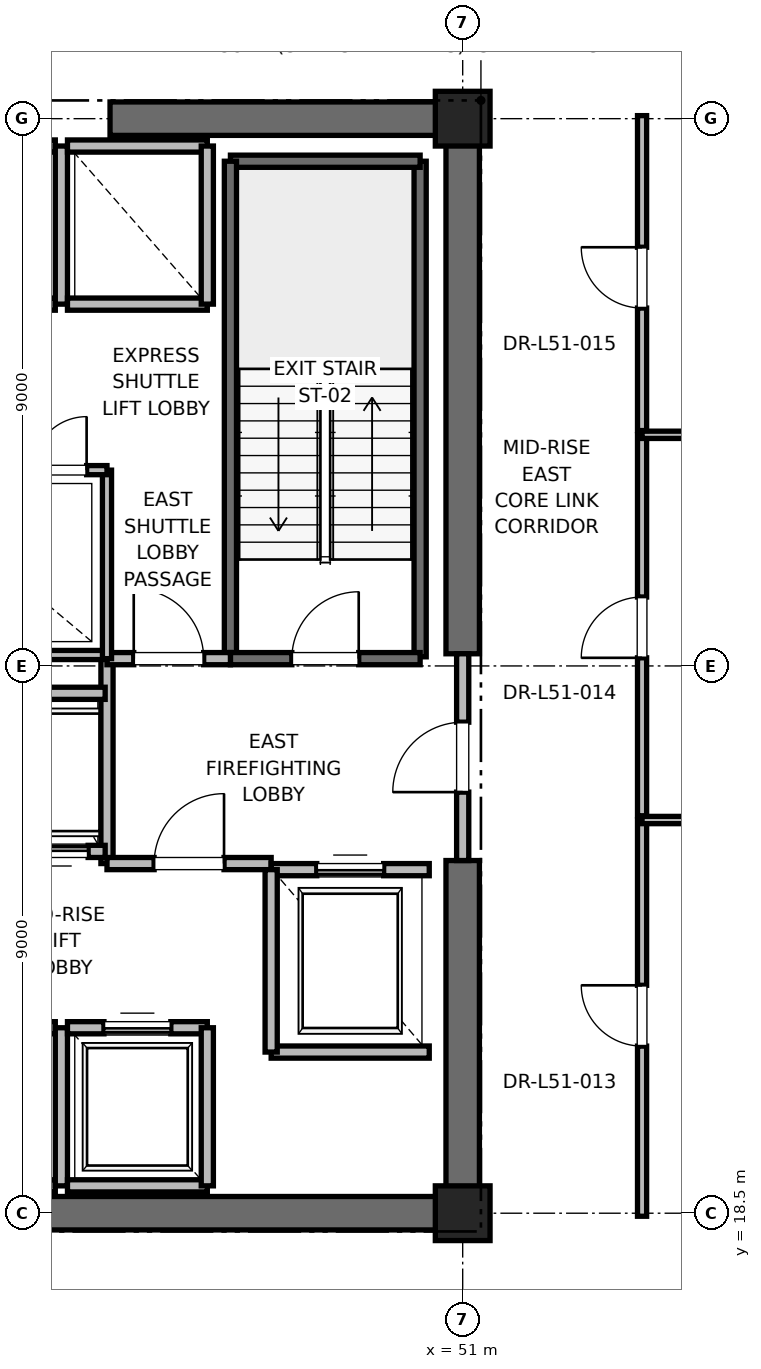
"""IFC4 building model, lengths in metres.
Left out: names, types, materials, properties, quantities, classifications, styles, units other than length and angle.
Written with IfcOpenShell. Run it as: python <this file> out.ifc"""

import sys

from ifc_helpers import new_model, si_unit, direction, frame, frame_2d, origin, origin_2d, place, context, subcontext, project, spatial, rectangle, extrude, element, fill, save


model = new_model("IFC4")
c1 = context("Model", 3, precision=1e-05, world=origin(), true_north=direction((0.0, 1.0)))
c2 = subcontext(c1, "Body", "Model", "MODEL_VIEW")
j1 = project(units=[si_unit("LENGTHUNIT", "METRE"), si_unit("PLANEANGLEUNIT", "RADIAN")], contexts=[c1])
p1 = place(None, origin())
s1 = spatial("IfcSite", under=j1, at=p1, CompositionType="ELEMENT")
p2 = place(p1, origin())
s2 = spatial("IfcBuilding", under=s1, at=p2, CompositionType="ELEMENT")
p3 = place(p2, frame((0.0, 0.0, 221.2)))
s3 = spatial("IfcBuildingStorey", under=s2, at=p3, CompositionType="ELEMENT", Elevation=221.2)
for number, where, z_axis, x_axis in (
    (1, (51.0, 18.5, 0.0), (0.0, 0.0, 1.0), (1.0, 0.0, 0.0)),
    (2, (51.0, 36.5, 0.0), (0.0, 0.0, 1.0), (1.0, 0.0, 0.0)),
):
    element("IfcColumn", number, at=place(p3, frame(where, z_axis=z_axis, x_axis=x_axis)), inside=s3, PredefinedType="PILASTER", context=c2, shape_type="SweptSolid", body=[
        extrude(rectangle(XDim=0.9, YDim=0.9, at=origin_2d()), origin(), (0.0, 0.0, 1.0), 4.0),
    ])
p4 = place(p3, frame((41.8, 18.5, 0.0), z_axis=(0.0, 0.0, 1.0), x_axis=(1.0, 0.0, 0.0)))
e3 = element("IfcWall", 3, at=p4, inside=s3, PredefinedType="SHEAR", context=c2, shape_type="SweptSolid", body=[
    extrude(rectangle(XDim=9.2, YDim=0.55, at=frame_2d((4.6, 0.0))), origin(), (0.0, 0.0, 1.0), 3.775),
])
for number, where, z_axis, x_axis in (
    (4, (45.2, 36.5, 0.0), (0.0, 0.0, 1.0), (1.0, 0.0, 0.0)),
    (5, (51.0, 18.5, 0.0), (0.0, 0.0, 1.0), (0.0, 1.0, 0.0)),
):
    element("IfcWall", number, at=place(p3, frame(where, z_axis=z_axis, x_axis=x_axis)), inside=s3, PredefinedType="SHEAR", context=c2, shape_type="SweptSolid", body=[
        extrude(rectangle(XDim=5.8, YDim=0.55, at=frame_2d((2.9, 0.0))), origin(), (0.0, 0.0, 1.0), 3.775),
    ])
p5 = place(p3, frame((51.0, 27.7, 0.0), z_axis=(0.0, 0.0, 1.0), x_axis=(0.0, 1.0, 0.0)))
e6 = element("IfcWall", 6, at=p5, inside=s3, PredefinedType="SHEAR", context=c2, shape_type="SweptSolid", body=[
    extrude(rectangle(XDim=8.8, YDim=0.55, at=frame_2d((4.4, 0.0))), origin(), (0.0, 0.0, 1.0), 3.775),
])
p6 = place(p3, frame((50.3, 27.65, 0.0), z_axis=(0.0, 0.0, 1.0), x_axis=(0.0, 1.0, 0.0)))
e7 = element("IfcWall", 7, at=p6, inside=s3, PredefinedType="SOLIDWALL", context=c2, shape_type="SweptSolid", body=[
    extrude(rectangle(XDim=8.15, YDim=0.2, at=frame_2d((4.075, 0.0))), origin(), (0.0, 0.0, 1.0), 3.775),
])
p7 = place(p3, frame((47.18, 35.8, 0.0), z_axis=(0.0, 0.0, 1.0), x_axis=(1.0, 0.0, 0.0)))
e8 = element("IfcWall", 8, at=p7, inside=s3, PredefinedType="SOLIDWALL", context=c2, shape_type="SweptSolid", body=[
    extrude(rectangle(XDim=3.12, YDim=0.2, at=frame_2d((1.56, 0.0))), origin(), (0.0, 0.0, 1.0), 3.775),
])
p8 = place(p3, frame((47.18, 27.62, 0.0), z_axis=(0.0, 0.0, 1.0), x_axis=(0.0, 1.0, 0.0)))
e9 = element("IfcWall", 9, at=p8, inside=s3, PredefinedType="SOLIDWALL", context=c2, shape_type="SweptSolid", body=[
    extrude(rectangle(XDim=8.18, YDim=0.2, at=frame_2d((4.09, 0.0))), origin(), (0.0, 0.0, 1.0), 3.775),
])
p9 = place(p3, frame((47.18, 27.62, 0.0), z_axis=(0.0, 0.0, 1.0), x_axis=(1.0, 0.0, 0.0)))
e10 = element("IfcWall", 10, at=p9, inside=s3, PredefinedType="SOLIDWALL", context=c2, shape_type="SweptSolid", body=[
    extrude(rectangle(XDim=3.12, YDim=0.2, at=frame_2d((1.56, 0.0))), origin(), (0.0, 0.0, 1.0), 3.775),
])
p10 = place(p9, frame((1.01, 0.0, 0.0)))
e11 = element("IfcOpeningElement", 11, at=p10, cuts=e10, PredefinedType="OPENING", context=c2, shape_type="SweptSolid", body=[
    extrude(rectangle(XDim=1.1, YDim=2.15, at=frame_2d((0.55, 1.075))), frame((0.0, 0.1, 0.0), z_axis=(0.0, -1.0, 0.0), x_axis=(1.0, 0.0, 0.0)), (0.0, 0.0, 1.0), 0.2),
])
p11 = place(p3, frame((45.15, 24.25, 0.0), z_axis=(0.0, 0.0, 1.0), x_axis=(0.0, 1.0, 0.0)))
e12 = element("IfcWall", 12, at=p11, inside=s3, PredefinedType="PARTITIONING", context=c2, shape_type="SweptSolid", body=[
    extrude(rectangle(XDim=3.37, YDim=0.2, at=frame_2d((1.685, 0.0))), origin(), (0.0, 0.0, 1.0), 3.775),
])
p12 = place(p3, frame((45.15, 24.25, 0.0), z_axis=(0.0, 0.0, 1.0), x_axis=(1.0, 0.0, 0.0)))
e13 = element("IfcWall", 13, at=p12, inside=s3, PredefinedType="PARTITIONING", context=c2, shape_type="SweptSolid", body=[
    extrude(rectangle(XDim=2.7, YDim=0.2, at=frame_2d((1.35, 0.0))), origin(), (0.0, 0.0, 1.0), 3.775),
])
p13 = place(p12, frame((0.775, 0.0, 0.0)))
e14 = element("IfcOpeningElement", 14, at=p13, cuts=e13, PredefinedType="OPENING", context=c2, shape_type="SweptSolid", body=[
    extrude(rectangle(XDim=1.15, YDim=2.2, at=frame_2d((0.575, 1.1))), frame((0.0, 0.1, 0.0), z_axis=(0.0, -1.0, 0.0), x_axis=(1.0, 0.0, 0.0)), (0.0, 0.0, 1.0), 0.2),
])
p14 = place(p3, frame((45.15, 27.62, 0.0), z_axis=(0.0, 0.0, 1.0), x_axis=(1.0, 0.0, 0.0)))
e15 = element("IfcWall", 15, at=p14, inside=s3, PredefinedType="PARTITIONING", context=c2, shape_type="SweptSolid", body=[
    extrude(rectangle(XDim=2.03, YDim=0.2, at=frame_2d((1.015, 0.0))), origin(), (0.0, 0.0, 1.0), 3.775),
])
p15 = place(p14, frame((0.44, 0.0, 0.0)))
e16 = element("IfcOpeningElement", 16, at=p15, cuts=e15, PredefinedType="OPENING", context=c2, shape_type="SweptSolid", body=[
    extrude(rectangle(XDim=1.15, YDim=2.2, at=frame_2d((0.575, 1.1))), frame((0.0, 0.1, 0.0), z_axis=(0.0, -1.0, 0.0), x_axis=(1.0, 0.0, 0.0)), (0.0, 0.0, 1.0), 0.2),
])
p16 = place(p3, frame((51.0, 24.3, 0.0), z_axis=(0.0, 0.0, 1.0), x_axis=(0.0, 1.0, 0.0)))
e17 = element("IfcWall", 17, at=p16, inside=s3, PredefinedType="PARTITIONING", context=c2, shape_type="SweptSolid", body=[
    extrude(rectangle(XDim=3.4, YDim=0.2, at=frame_2d((1.7, 0.0))), origin(), (0.0, 0.0, 1.0), 2.755),
])
p17 = place(p16, frame((1.125, 0.0, 0.0)))
e18 = element("IfcOpeningElement", 18, at=p17, cuts=e17, PredefinedType="OPENING", context=c2, shape_type="SweptSolid", body=[
    extrude(rectangle(XDim=1.15, YDim=2.2, at=frame_2d((0.575, 1.1))), frame((0.0, 0.1, 0.0), z_axis=(0.0, -1.0, 0.0), x_axis=(1.0, 0.0, 0.0)), (0.0, 0.0, 1.0), 0.2),
])
p18 = place(p3, frame((47.85, 21.15, 0.0), z_axis=(0.0, 0.0, 1.0), x_axis=(1.0, 0.0, 0.0)))
e19 = element("IfcWall", 19, at=p18, inside=s3, PredefinedType="SOLIDWALL", context=c2, shape_type="SweptSolid", body=[
    extrude(rectangle(XDim=2.6, YDim=0.2, at=frame_2d((1.3, 0.0))), origin(), (0.0, 0.0, 1.0), 3.775),
])
p19 = place(p3, frame((50.45, 24.15, 0.0), z_axis=(0.0, 0.0, 1.0), x_axis=(-1.0, 0.0, 0.0)))
e20 = element("IfcWall", 20, at=p19, inside=s3, PredefinedType="SOLIDWALL", context=c2, shape_type="SweptSolid", body=[
    extrude(rectangle(XDim=2.6, YDim=0.2, at=frame_2d((1.3, 0.0))), origin(), (0.0, 0.0, 1.0), 2.755),
])
p20 = place(p19, frame((0.75, 0.0, 0.0)))
e21 = element("IfcOpeningElement", 21, at=p20, cuts=e20, PredefinedType="OPENING", context=c2, shape_type="SweptSolid", body=[
    extrude(rectangle(XDim=1.1, YDim=2.2, at=frame_2d((0.55, 1.1))), frame((0.0, 0.1, 0.0), z_axis=(0.0, -1.0, 0.0), x_axis=(1.0, 0.0, 0.0)), (0.0, 0.0, 1.0), 0.2),
])
p21 = place(p3, frame((47.85, 24.15, 0.0), z_axis=(0.0, 0.0, 1.0), x_axis=(0.0, -1.0, 0.0)))
e22 = element("IfcWall", 22, at=p21, inside=s3, PredefinedType="SOLIDWALL", context=c2, shape_type="SweptSolid", body=[
    extrude(rectangle(XDim=3.0, YDim=0.2, at=frame_2d((1.5, 0.0))), origin(), (0.0, 0.0, 1.0), 3.775),
])
p22 = place(p3, frame((42.0, 18.95, 0.0), z_axis=(0.0, 0.0, 1.0), x_axis=(1.0, 0.0, 0.0)))
e23 = element("IfcWall", 23, at=p22, inside=s3, PredefinedType="SOLIDWALL", context=c2, shape_type="SweptSolid", body=[
    extrude(rectangle(XDim=2.3, YDim=0.2, at=frame_2d((1.15, 0.0))), origin(), (0.0, 0.0, 1.0), 2.755),
])
p23 = place(p3, frame((44.3, 21.55, 0.0), z_axis=(0.0, 0.0, 1.0), x_axis=(-1.0, 0.0, 0.0)))
e24 = element("IfcWall", 24, at=p23, inside=s3, PredefinedType="SOLIDWALL", context=c2, shape_type="SweptSolid", body=[
    extrude(rectangle(XDim=2.3, YDim=0.2, at=frame_2d((1.15, 0.0))), origin(), (0.0, 0.0, 1.0), 3.775),
])
p24 = place(p23, frame((0.6, 0.0, 0.0)))
e25 = element("IfcOpeningElement", 25, at=p24, cuts=e24, PredefinedType="OPENING", context=c2, shape_type="SweptSolid", body=[
    extrude(rectangle(XDim=1.1, YDim=2.2, at=frame_2d((0.55, 1.1))), frame((0.0, 0.1, 0.0), z_axis=(0.0, -1.0, 0.0), x_axis=(1.0, 0.0, 0.0)), (0.0, 0.0, 1.0), 0.2),
])
p25 = place(p3, frame((44.4, 18.95, 0.0), z_axis=(0.0, 0.0, 1.0), x_axis=(0.0, 1.0, 0.0)))
e26 = element("IfcWall", 26, at=p25, inside=s3, PredefinedType="SOLIDWALL", context=c2, shape_type="SweptSolid", body=[
    extrude(rectangle(XDim=2.6, YDim=0.2, at=frame_2d((1.3, 0.0))), origin(), (0.0, 0.0, 1.0), 3.775),
])
p26 = place(p3, frame((44.5, 18.95, 0.0), z_axis=(0.0, 0.0, 1.0), x_axis=(1.0, 0.0, 0.0)))
e27 = element("IfcWall", 27, at=p26, inside=s3, PredefinedType="SOLIDWALL", context=c2, shape_type="SweptSolid", body=[
    extrude(rectangle(XDim=2.3, YDim=0.2, at=frame_2d((1.15, 0.0))), origin(), (0.0, 0.0, 1.0), 3.775),
])
p27 = place(p3, frame((46.8, 21.55, 0.0), z_axis=(0.0, 0.0, 1.0), x_axis=(-1.0, 0.0, 0.0)))
e28 = element("IfcWall", 28, at=p27, inside=s3, PredefinedType="SOLIDWALL", context=c2, shape_type="SweptSolid", body=[
    extrude(rectangle(XDim=2.3, YDim=0.2, at=frame_2d((1.15, 0.0))), origin(), (0.0, 0.0, 1.0), 3.775),
])
p28 = place(p27, frame((0.6, 0.0, 0.0)))
e29 = element("IfcOpeningElement", 29, at=p28, cuts=e28, PredefinedType="OPENING", context=c2, shape_type="SweptSolid", body=[
    extrude(rectangle(XDim=1.1, YDim=2.2, at=frame_2d((0.55, 1.1))), frame((0.0, 0.1, 0.0), z_axis=(0.0, -1.0, 0.0), x_axis=(1.0, 0.0, 0.0)), (0.0, 0.0, 1.0), 0.2),
])
p29 = place(p3, frame((46.8, 18.95, 0.0), z_axis=(0.0, 0.0, 1.0), x_axis=(0.0, 1.0, 0.0)))
e30 = element("IfcWall", 30, at=p29, inside=s3, PredefinedType="SOLIDWALL", context=c2, shape_type="SweptSolid", body=[
    extrude(rectangle(XDim=2.6, YDim=0.2, at=frame_2d((1.3, 0.0))), origin(), (0.0, 0.0, 1.0), 3.775),
])
p30 = place(p3, frame((43.46, 24.45, 0.0), z_axis=(0.0, 0.0, 1.0), x_axis=(1.0, 0.0, 0.0)))
e31 = element("IfcWall", 31, at=p30, inside=s3, PredefinedType="SOLIDWALL", context=c2, shape_type="SweptSolid", body=[
    extrude(rectangle(XDim=1.66, YDim=0.2, at=frame_2d((0.83, 0.0))), origin(), (0.0, 0.0, 1.0), 3.775),
])
p31 = place(p30, frame((0.28, 0.0, 0.0)))
e32 = element("IfcOpeningElement", 32, at=p31, cuts=e31, PredefinedType="OPENING", context=c2, shape_type="SweptSolid", body=[
    extrude(rectangle(XDim=1.1, YDim=2.2, at=frame_2d((0.55, 1.1))), frame((0.0, 0.1, 0.0), z_axis=(0.0, -1.0, 0.0), x_axis=(1.0, 0.0, 0.0)), (0.0, 0.0, 1.0), 0.2),
])
p32 = place(p3, frame((45.12, 27.05, 0.0), z_axis=(0.0, 0.0, 1.0), x_axis=(-1.0, 0.0, 0.0)))
e33 = element("IfcWall", 33, at=p32, inside=s3, PredefinedType="SOLIDWALL", context=c2, shape_type="SweptSolid", body=[
    extrude(rectangle(XDim=1.66, YDim=0.2, at=frame_2d((0.83, 0.0))), origin(), (0.0, 0.0, 1.0), 3.775),
])
p33 = place(p3, frame((42.0, 33.45, 0.0), z_axis=(0.0, 0.0, 1.0), x_axis=(1.0, 0.0, 0.0)))
e34 = element("IfcWall", 34, at=p33, inside=s3, PredefinedType="SOLIDWALL", context=c2, shape_type="SweptSolid", body=[
    extrude(rectangle(XDim=2.3, YDim=0.2, at=frame_2d((1.15, 0.0))), origin(), (0.0, 0.0, 1.0), 3.775),
])
p34 = place(p3, frame((44.3, 36.05, 0.0), z_axis=(0.0, 0.0, 1.0), x_axis=(-1.0, 0.0, 0.0)))
e35 = element("IfcWall", 35, at=p34, inside=s3, PredefinedType="SOLIDWALL", context=c2, shape_type="SweptSolid", body=[
    extrude(rectangle(XDim=2.3, YDim=0.2, at=frame_2d((1.15, 0.0))), origin(), (0.0, 0.0, 1.0), 2.755),
])
p35 = place(p3, frame((44.4, 33.45, 0.0), z_axis=(0.0, 0.0, 1.0), x_axis=(0.0, 1.0, 0.0)))
e36 = element("IfcWall", 36, at=p35, inside=s3, PredefinedType="SOLIDWALL", context=c2, shape_type="SweptSolid", body=[
    extrude(rectangle(XDim=2.6, YDim=0.2, at=frame_2d((1.3, 0.0))), origin(), (0.0, 0.0, 1.0), 2.755),
])
p36 = place(p3, frame((44.5, 33.45, 0.0), z_axis=(0.0, 0.0, 1.0), x_axis=(1.0, 0.0, 0.0)))
e37 = element("IfcWall", 37, at=p36, inside=s3, PredefinedType="SOLIDWALL", context=c2, shape_type="SweptSolid", body=[
    extrude(rectangle(XDim=2.3, YDim=0.2, at=frame_2d((1.15, 0.0))), origin(), (0.0, 0.0, 1.0), 3.775),
])
p37 = place(p3, frame((46.8, 36.05, 0.0), z_axis=(0.0, 0.0, 1.0), x_axis=(-1.0, 0.0, 0.0)))
e38 = element("IfcWall", 38, at=p37, inside=s3, PredefinedType="SOLIDWALL", context=c2, shape_type="SweptSolid", body=[
    extrude(rectangle(XDim=2.3, YDim=0.2, at=frame_2d((1.15, 0.0))), origin(), (0.0, 0.0, 1.0), 2.755),
])
p38 = place(p3, frame((46.8, 33.45, 0.0), z_axis=(0.0, 0.0, 1.0), x_axis=(0.0, 1.0, 0.0)))
e39 = element("IfcWall", 39, at=p38, inside=s3, PredefinedType="SOLIDWALL", context=c2, shape_type="SweptSolid", body=[
    extrude(rectangle(XDim=2.6, YDim=0.2, at=frame_2d((1.3, 0.0))), origin(), (0.0, 0.0, 1.0), 3.775),
])
p39 = place(p3, frame((41.56, 27.68, 0.0), z_axis=(0.0, 0.0, 1.0), x_axis=(1.0, 0.0, 0.0)))
e40 = element("IfcWall", 40, at=p39, inside=s3, PredefinedType="PARTITIONING", context=c2, shape_type="SweptSolid", body=[
    extrude(rectangle(XDim=3.59, YDim=0.15, at=frame_2d((1.795, 0.0))), origin(), (0.0, 0.0, 1.0), 2.85),
])
p40 = place(p3, frame((45.15, 27.62, 0.0), z_axis=(0.0, 0.0, 1.0), x_axis=(0.0, 1.0, 0.0)))
e41 = element("IfcWall", 41, at=p40, inside=s3, PredefinedType="PARTITIONING", context=c2, shape_type="SweptSolid", body=[
    extrude(rectangle(XDim=3.1, YDim=0.15, at=frame_2d((1.55, 0.0))), origin(), (0.0, 0.0, 1.0), 2.85),
])
p41 = place(p3, frame((43.6, 30.72, 0.0), z_axis=(0.0, 0.0, 1.0), x_axis=(1.0, 0.0, 0.0)))
e42 = element("IfcWall", 42, at=p41, inside=s3, PredefinedType="PARTITIONING", context=c2, shape_type="SweptSolid", body=[
    extrude(rectangle(XDim=1.55, YDim=0.15, at=frame_2d((0.775, 0.0))), origin(), (0.0, 0.0, 1.0), 2.85),
])
p42 = place(p41, frame((0.335, 0.0, 0.0)))
e43 = element("IfcOpeningElement", 43, at=p42, cuts=e42, PredefinedType="OPENING", context=c2, shape_type="SweptSolid", body=[
    extrude(rectangle(XDim=0.88, YDim=2.1, at=frame_2d((0.44, 1.05))), frame((0.0, 0.075, 0.0), z_axis=(0.0, -1.0, 0.0), x_axis=(1.0, 0.0, 0.0)), (0.0, 0.0, 1.0), 0.15),
])
p43 = place(p3, frame((53.95, 18.45, 0.0), z_axis=(0.0, 0.0, 1.0), x_axis=(0.0, 1.0, 0.0)))
e44 = element("IfcWall", 44, at=p43, inside=s3, PredefinedType="PARTITIONING", context=c2, shape_type="SweptSolid", body=[
    extrude(rectangle(XDim=6.516, YDim=0.15, at=frame_2d((3.258, 0.0))), origin(), (0.0, 0.0, 1.0), 2.85),
])
p44 = place(p43, frame((2.798, 0.0, 0.0)))
e45 = element("IfcOpeningElement", 45, at=p44, cuts=e44, PredefinedType="OPENING", context=c2, shape_type="SweptSolid", body=[
    extrude(rectangle(XDim=1.0, YDim=2.15, at=frame_2d((0.5, 1.075))), frame((0.0, 0.075, 0.0), z_axis=(0.0, -1.0, 0.0), x_axis=(1.0, 0.0, 0.0)), (0.0, 0.0, 1.0), 0.15),
])
p45 = place(p3, frame((53.95, 24.966, 0.0), z_axis=(0.0, 0.0, 1.0), x_axis=(1.0, 0.0, 0.0)))
e46 = element("IfcWall", 46, at=p45, inside=s3, PredefinedType="PARTITIONING", context=c2, shape_type="SweptSolid", body=[
    extrude(rectangle(XDim=11.581, YDim=0.12, at=frame_2d((5.791, 0.0))), origin(), (0.0, 0.0, 1.0), 2.85),
])
p46 = place(p3, frame((53.95, 25.036, 0.0), z_axis=(0.0, 0.0, 1.0), x_axis=(0.0, 1.0, 0.0)))
e47 = element("IfcWall", 47, at=p46, inside=s3, PredefinedType="PARTITIONING", context=c2, shape_type="SweptSolid", body=[
    extrude(rectangle(XDim=6.265, YDim=0.15, at=frame_2d((3.133, 0.0))), origin(), (0.0, 0.0, 1.0), 2.85),
])
p47 = place(p46, frame((2.597, 0.0, 0.0)))
e48 = element("IfcOpeningElement", 48, at=p47, cuts=e47, PredefinedType="OPENING", context=c2, shape_type="SweptSolid", body=[
    extrude(rectangle(XDim=1.0, YDim=2.15, at=frame_2d((0.5, 1.075))), frame((0.0, 0.075, 0.0), z_axis=(0.0, -1.0, 0.0), x_axis=(1.0, 0.0, 0.0)), (0.0, 0.0, 1.0), 0.15),
])
p48 = place(p3, frame((53.95, 31.301, 0.0), z_axis=(0.0, 0.0, 1.0), x_axis=(1.0, 0.0, 0.0)))
e49 = element("IfcWall", 49, at=p48, inside=s3, PredefinedType="PARTITIONING", context=c2, shape_type="SweptSolid", body=[
    extrude(rectangle(XDim=11.581, YDim=0.12, at=frame_2d((5.791, 0.0))), origin(), (0.0, 0.0, 1.0), 2.85),
])
p49 = place(p3, frame((53.95, 31.371, 0.0), z_axis=(0.0, 0.0, 1.0), x_axis=(0.0, 1.0, 0.0)))
e50 = element("IfcWall", 50, at=p49, inside=s3, PredefinedType="PARTITIONING", context=c2, shape_type="SweptSolid", body=[
    extrude(rectangle(XDim=5.179, YDim=0.15, at=frame_2d((2.589, 0.0))), origin(), (0.0, 0.0, 1.0), 2.85),
])
p50 = place(p49, frame((2.014, 0.0, 0.0)))
e51 = element("IfcOpeningElement", 51, at=p50, cuts=e50, PredefinedType="OPENING", context=c2, shape_type="SweptSolid", body=[
    extrude(rectangle(XDim=1.0, YDim=2.15, at=frame_2d((0.5, 1.075))), frame((0.0, 0.075, 0.0), z_axis=(0.0, -1.0, 0.0), x_axis=(1.0, 0.0, 0.0)), (0.0, 0.0, 1.0), 0.15),
])
p51 = place(p10, origin())
e52 = element("IfcDoor", 52, at=p51, inside=s3, OperationType="SINGLE_SWING_RIGHT", PredefinedType="DOOR", context=c2, shape_type="SweptSolid", body=[
    extrude(rectangle(XDim=1.1, YDim=2.15, at=frame_2d((0.55, 1.075))), frame((0.0, 0.025, 0.0), z_axis=(0.0, -1.0, 0.0), x_axis=(1.0, 0.0, 0.0)), (0.0, 0.0, 1.0), 0.05),
])
fill(e11, e52)
p52 = place(p13, origin())
e53 = element("IfcDoor", 53, at=p52, inside=s3, OperationType="SINGLE_SWING_RIGHT", PredefinedType="DOOR", context=c2, shape_type="SweptSolid", body=[
    extrude(rectangle(XDim=1.15, YDim=2.2, at=frame_2d((0.575, 1.1))), frame((0.0, 0.025, 0.0), z_axis=(0.0, -1.0, 0.0), x_axis=(1.0, 0.0, 0.0)), (0.0, 0.0, 1.0), 0.05),
])
fill(e14, e53)
p53 = place(p15, origin())
e54 = element("IfcDoor", 54, at=p53, inside=s3, OperationType="SINGLE_SWING_LEFT", PredefinedType="DOOR", context=c2, shape_type="SweptSolid", body=[
    extrude(rectangle(XDim=1.15, YDim=2.2, at=frame_2d((0.575, 1.1))), frame((0.0, 0.025, 0.0), z_axis=(0.0, -1.0, 0.0), x_axis=(1.0, 0.0, 0.0)), (0.0, 0.0, 1.0), 0.05),
])
fill(e16, e54)
p54 = place(p17, origin())
e55 = element("IfcDoor", 55, at=p54, inside=s3, OperationType="SINGLE_SWING_LEFT", PredefinedType="DOOR", context=c2, shape_type="SweptSolid", body=[
    extrude(rectangle(XDim=1.15, YDim=2.2, at=frame_2d((0.575, 1.1))), frame((0.0, 0.025, 0.0), z_axis=(0.0, -1.0, 0.0), x_axis=(1.0, 0.0, 0.0)), (0.0, 0.0, 1.0), 0.05),
])
fill(e18, e55)
p55 = place(p20, origin())
e56 = element("IfcDoor", 56, at=p55, inside=s3, OperationType="SLIDING_TO_RIGHT", PredefinedType="DOOR", context=c2, shape_type="SweptSolid", body=[
    extrude(rectangle(XDim=1.1, YDim=2.2, at=frame_2d((0.55, 1.1))), frame((0.0, 0.025, 0.0), z_axis=(0.0, -1.0, 0.0), x_axis=(1.0, 0.0, 0.0)), (0.0, 0.0, 1.0), 0.05),
])
fill(e21, e56)
p56 = place(p28, origin())
e57 = element("IfcDoor", 57, at=p56, inside=s3, OperationType="SLIDING_TO_RIGHT", PredefinedType="DOOR", context=c2, shape_type="SweptSolid", body=[
    extrude(rectangle(XDim=1.1, YDim=2.2, at=frame_2d((0.55, 1.1))), frame((0.0, 0.025, 0.0), z_axis=(0.0, -1.0, 0.0), x_axis=(1.0, 0.0, 0.0)), (0.0, 0.0, 1.0), 0.05),
])
fill(e29, e57)
p57 = place(p31, origin())
e58 = element("IfcDoor", 58, at=p57, inside=s3, OperationType="SLIDING_TO_RIGHT", PredefinedType="DOOR", context=c2, shape_type="SweptSolid", body=[
    extrude(rectangle(XDim=1.1, YDim=2.2, at=frame_2d((0.55, 1.1))), frame((0.0, 0.025, 0.0), z_axis=(0.0, -1.0, 0.0), x_axis=(1.0, 0.0, 0.0)), (0.0, 0.0, 1.0), 0.05),
])
fill(e32, e58)
p58 = place(p42, origin())
e59 = element("IfcDoor", 59, at=p58, inside=s3, OperationType="SINGLE_SWING_RIGHT", PredefinedType="DOOR", context=c2, shape_type="SweptSolid", body=[
    extrude(rectangle(XDim=0.88, YDim=2.1, at=frame_2d((0.44, 1.05))), frame((0.0, 0.025, 0.0), z_axis=(0.0, -1.0, 0.0), x_axis=(1.0, 0.0, 0.0)), (0.0, 0.0, 1.0), 0.05),
])
fill(e43, e59)
p59 = place(p44, origin())
e60 = element("IfcDoor", 60, at=p59, inside=s3, OperationType="SINGLE_SWING_RIGHT", PredefinedType="DOOR", context=c2, shape_type="SweptSolid", body=[
    extrude(rectangle(XDim=1.0, YDim=2.15, at=frame_2d((0.5, 1.075))), frame((0.0, 0.025, 0.0), z_axis=(0.0, -1.0, 0.0), x_axis=(1.0, 0.0, 0.0)), (0.0, 0.0, 1.0), 0.05),
])
fill(e45, e60)
p60 = place(p47, origin())
e61 = element("IfcDoor", 61, at=p60, inside=s3, OperationType="SINGLE_SWING_LEFT", PredefinedType="DOOR", context=c2, shape_type="SweptSolid", body=[
    extrude(rectangle(XDim=1.0, YDim=2.15, at=frame_2d((0.5, 1.075))), frame((0.0, 0.025, 0.0), z_axis=(0.0, -1.0, 0.0), x_axis=(1.0, 0.0, 0.0)), (0.0, 0.0, 1.0), 0.05),
])
fill(e48, e61)
p61 = place(p50, origin())
e62 = element("IfcDoor", 62, at=p61, inside=s3, OperationType="SINGLE_SWING_RIGHT", PredefinedType="DOOR", context=c2, shape_type="SweptSolid", body=[
    extrude(rectangle(XDim=1.0, YDim=2.15, at=frame_2d((0.5, 1.075))), frame((0.0, 0.025, 0.0), z_axis=(0.0, -1.0, 0.0), x_axis=(1.0, 0.0, 0.0)), (0.0, 0.0, 1.0), 0.05),
])
fill(e51, e62)
save(model, sys.argv[1])
